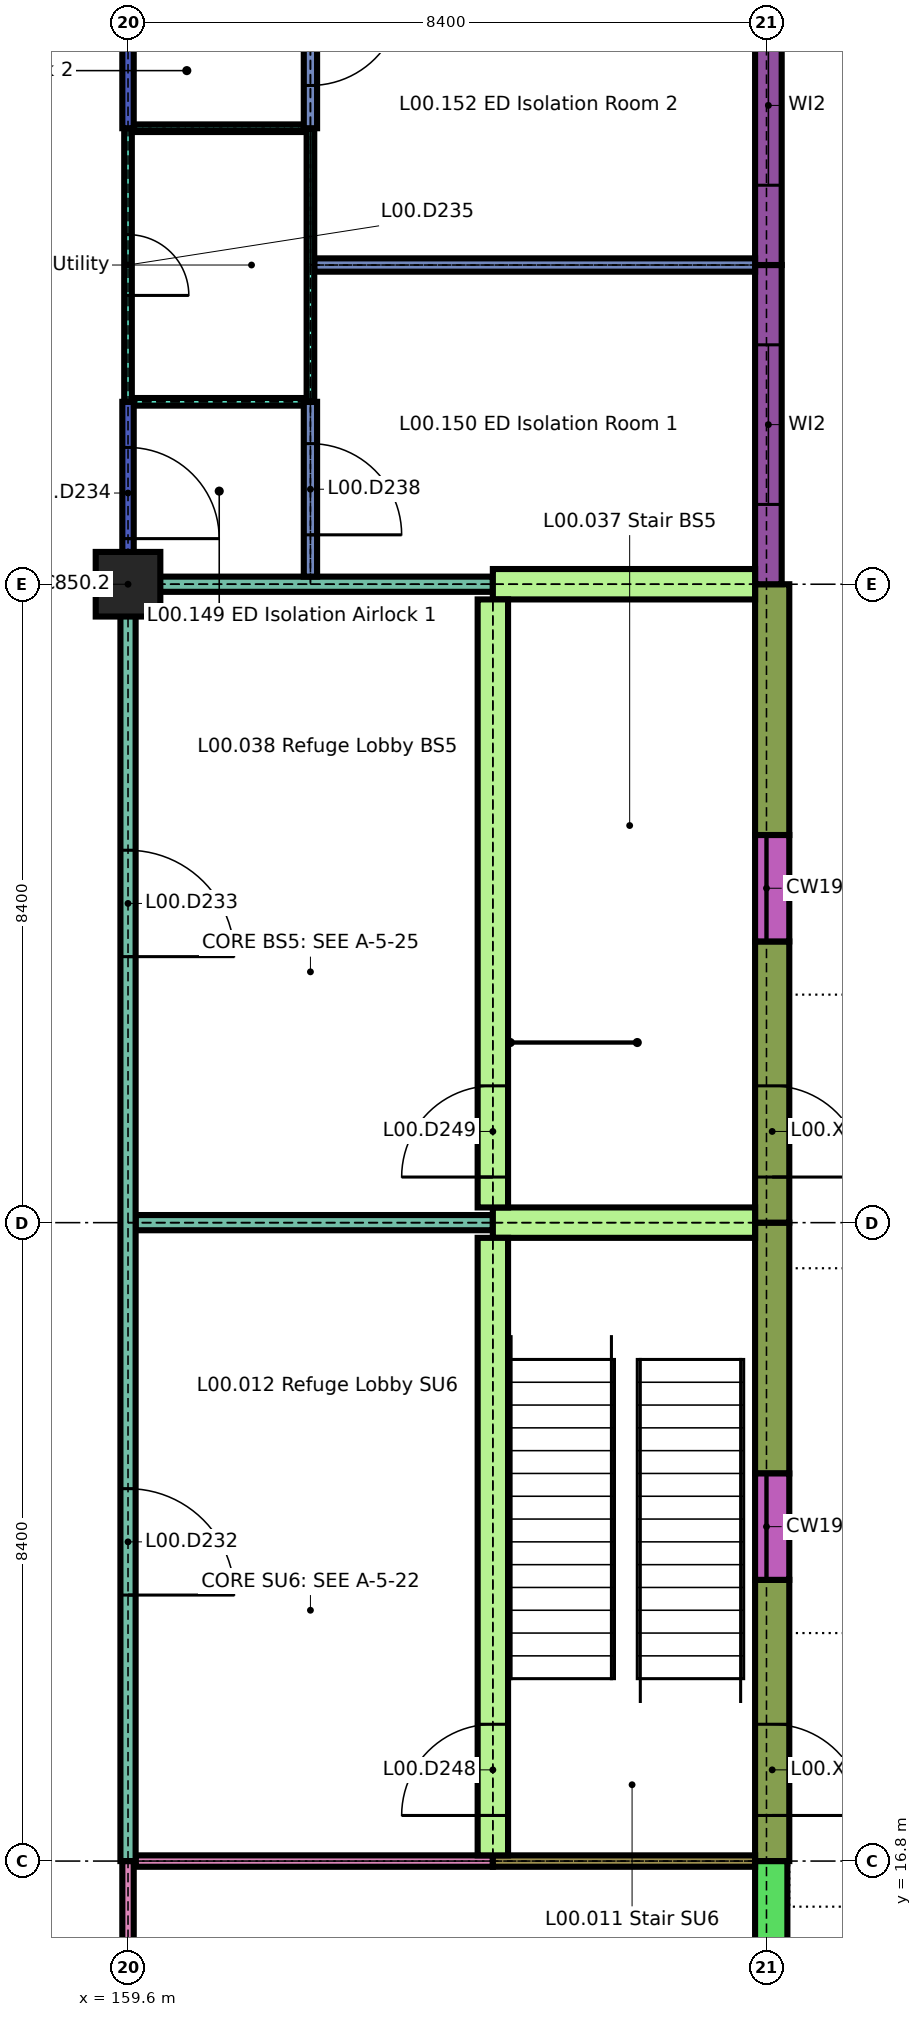
"""IFC4 building model, lengths in metres.
Left out: names, types, materials, properties, quantities, classifications, styles, units other than length and angle.
Written with IfcOpenShell. Run it as: python <this file> out.ifc"""

import sys

from ifc_helpers import new_model, si_unit, direction, frame, frame_2d, origin, origin_2d, place, context, subcontext, project, spatial, rectangle, extrude, element, fill, save


model = new_model("IFC4")
c1 = context("Model", 3, precision=1e-05, world=origin(), true_north=direction((0.0, 1.0)))
c2 = subcontext(c1, "Body", "Model", "MODEL_VIEW")
j1 = project(units=[si_unit("LENGTHUNIT", "METRE"), si_unit("PLANEANGLEUNIT", "RADIAN")], contexts=[c1])
p1 = place(None, origin())
s1 = spatial("IfcSite", under=j1, at=p1, CompositionType="ELEMENT")
p2 = place(p1, origin())
s2 = spatial("IfcBuilding", under=s1, at=p2, CompositionType="ELEMENT")
p3 = place(p2, origin())
s3 = spatial("IfcBuildingStorey", under=s2, at=p3, CompositionType="ELEMENT", Elevation=0.0)
p4 = place(p3, frame((168.062, 11.4, 0.0), z_axis=(0.0, 0.0, 1.0), x_axis=(0.0, 1.0, 0.0)))
e1 = element("IfcWall", 1, at=p4, inside=s3, PredefinedType="SOLIDWALL", context=c2, shape_type="SweptSolid", body=[
    extrude(rectangle(XDim=5.4, YDim=0.425, at=frame_2d((2.7, 0.0))), origin(), (0.0, 0.0, 1.0), 3.84),
])
p5 = place(p3, frame((168.075, 16.8, 0.0), z_axis=(0.0, 0.0, 1.0), x_axis=(0.0, 1.0, 0.0)))
e2 = element("IfcWall", 2, at=p5, inside=s3, PredefinedType="SOLIDWALL", context=c2, shape_type="SweptSolid", body=[
    extrude(rectangle(XDim=3.7, YDim=0.45, at=frame_2d((1.85, 0.0))), origin(), (0.0, 0.0, 1.0), 4.14),
])
p6 = place(p5, frame((0.6, 0.0, 0.0)))
e3 = element("IfcOpeningElement", 3, at=p6, cuts=e2, PredefinedType="OPENING", context=c2, shape_type="SweptSolid", body=[
    extrude(rectangle(XDim=1.2, YDim=2.1, at=frame_2d((0.6, 1.05))), frame((0.0, 0.235, 0.0), z_axis=(0.0, -1.0, 0.0), x_axis=(1.0, 0.0, 0.0)), (0.0, 0.0, 1.0), 0.47),
])
p7 = place(p3, frame((168.075, 21.9, 0.0), z_axis=(0.0, 0.0, 1.0), x_axis=(0.0, 1.0, 0.0)))
e4 = element("IfcWall", 4, at=p7, inside=s3, PredefinedType="SOLIDWALL", context=c2, shape_type="SweptSolid", body=[
    extrude(rectangle(XDim=3.3, YDim=0.45, at=frame_2d((1.65, 0.0))), origin(), (0.0, 0.0, 1.0), 4.14),
])
p8 = place(p3, frame((168.075, 20.5, 0.0), z_axis=(0.0, 0.0, 1.0), x_axis=(0.0, 1.0, 0.0)))
e5 = element("IfcWall", 5, at=p8, inside=s3, PredefinedType="SOLIDWALL", context=c2, shape_type="SweptSolid", body=[
    extrude(rectangle(XDim=1.4, YDim=0.45, at=frame_2d((0.7, 0.0))), origin(), (0.0, 0.0, 1.0), 0.6),
])
p9 = place(p3, frame((168.075, 25.2, 0.0), z_axis=(0.0, 0.0, 1.0), x_axis=(0.0, 1.0, 0.0)))
e6 = element("IfcWall", 6, at=p9, inside=s3, PredefinedType="SOLIDWALL", context=c2, shape_type="SweptSolid", body=[
    extrude(rectangle(XDim=3.7, YDim=0.45, at=frame_2d((1.85, 0.0))), origin(), (0.0, 0.0, 1.0), 4.14),
])
p10 = place(p9, frame((0.6, 0.0, 0.0)))
e7 = element("IfcOpeningElement", 7, at=p10, cuts=e6, PredefinedType="OPENING", context=c2, shape_type="SweptSolid", body=[
    extrude(rectangle(XDim=1.2, YDim=2.1, at=frame_2d((0.6, 1.05))), frame((0.0, 0.235, 0.0), z_axis=(0.0, -1.0, 0.0), x_axis=(1.0, 0.0, 0.0)), (0.0, 0.0, 1.0), 0.47),
])
p11 = place(p3, frame((168.075, 30.3, 0.0), z_axis=(0.0, 0.0, 1.0), x_axis=(0.0, 1.0, 0.0)))
e8 = element("IfcWall", 8, at=p11, inside=s3, PredefinedType="SOLIDWALL", context=c2, shape_type="SweptSolid", body=[
    extrude(rectangle(XDim=3.3, YDim=0.45, at=frame_2d((1.65, 0.0))), origin(), (0.0, 0.0, 1.0), 4.14),
])
p12 = place(p3, frame((168.075, 28.9, 0.0), z_axis=(0.0, 0.0, 1.0), x_axis=(0.0, 1.0, 0.0)))
e9 = element("IfcWall", 9, at=p12, inside=s3, PredefinedType="SOLIDWALL", context=c2, shape_type="SweptSolid", body=[
    extrude(rectangle(XDim=1.4, YDim=0.45, at=frame_2d((0.7, 0.0))), origin(), (0.0, 0.0, 1.0), 0.6),
])
p13 = place(p3, frame((168.025, 33.6, 0.0), z_axis=(0.0, 0.0, 1.0), x_axis=(0.0, 1.0, 0.0)))
e10 = element("IfcWall", 10, at=p13, inside=s3, PredefinedType="SOLIDWALL", context=c2, shape_type="SweptSolid", body=[
    extrude(rectangle(XDim=4.2, YDim=0.35, at=frame_2d((2.1, 0.0))), origin(), (0.0, 0.0, 1.0), 3.84),
])
p14 = place(p13, frame((1.05, 0.0, 0.9)))
e11 = element("IfcOpeningElement", 11, at=p14, cuts=e10, PredefinedType="OPENING", context=c2, shape_type="SweptSolid", body=[
    extrude(rectangle(XDim=2.1, YDim=2.1, at=frame_2d((1.05, 1.05))), frame((0.0, 0.185, 0.0), z_axis=(0.0, -1.0, 0.0), x_axis=(1.0, 0.0, 0.0)), (0.0, 0.0, 1.0), 0.37),
])
p15 = place(p3, frame((168.025, 37.8, 0.0), z_axis=(0.0, 0.0, 1.0), x_axis=(0.0, 1.0, 0.0)))
e12 = element("IfcWall", 12, at=p15, inside=s3, PredefinedType="SOLIDWALL", context=c2, shape_type="SweptSolid", body=[
    extrude(rectangle(XDim=3.775, YDim=0.35, at=frame_2d((1.887, 0.0))), origin(), (0.0, 0.0, 1.0), 3.84),
])
p16 = place(p15, frame((1.05, 0.0, 0.9)))
e13 = element("IfcOpeningElement", 13, at=p16, cuts=e12, PredefinedType="OPENING", context=c2, shape_type="SweptSolid", body=[
    extrude(rectangle(XDim=2.1, YDim=2.1, at=frame_2d((1.05, 1.05))), frame((0.0, 0.185, 0.0), z_axis=(0.0, -1.0, 0.0), x_axis=(1.0, 0.0, 0.0)), (0.0, 0.0, 1.0), 0.37),
])
p17 = place(p3, frame((159.7, 16.8, 0.0), z_axis=(0.0, 0.0, 1.0), x_axis=(1.0, 0.0, 0.0)))
e14 = element("IfcWall", 14, at=p17, inside=s3, PredefinedType="PARTITIONING", context=c2, shape_type="SweptSolid", body=[
    extrude(rectangle(XDim=4.7, YDim=0.15, at=frame_2d((2.35, 0.0))), origin(), (0.0, 0.0, 1.0), 4.14),
])
p18 = place(p3, frame((164.4, 16.8, 0.0), z_axis=(0.0, 0.0, 1.0), x_axis=(1.0, 0.0, 0.0)))
e15 = element("IfcWall", 15, at=p18, inside=s3, PredefinedType="PARTITIONING", context=c2, shape_type="SweptSolid", body=[
    extrude(rectangle(XDim=3.45, YDim=0.15, at=frame_2d((1.725, 0.0))), origin(), (0.0, 0.0, 1.0), 4.14),
])
p19 = place(p3, frame((159.7, 25.2, 0.0), z_axis=(0.0, 0.0, 1.0), x_axis=(1.0, 0.0, 0.0)))
e16 = element("IfcWall", 16, at=p19, inside=s3, PredefinedType="PARTITIONING", context=c2, shape_type="SweptSolid", body=[
    extrude(rectangle(XDim=4.7, YDim=0.2, at=frame_2d((2.35, 0.0))), origin(), (0.0, 0.0, 1.0), 4.14),
])
p20 = place(p3, frame((164.4, 25.2, 0.0), z_axis=(0.0, 0.0, 1.0), x_axis=(1.0, 0.0, 0.0)))
e17 = element("IfcWall", 17, at=p20, inside=s3, PredefinedType="SHEAR", context=c2, shape_type="SweptSolid", body=[
    extrude(rectangle(XDim=3.45, YDim=0.4, at=frame_2d((1.725, 0.0))), origin(), (0.0, 0.0, 1.0), 4.14),
])
p21 = place(p3, frame((159.7, 33.6, 0.0), z_axis=(0.0, 0.0, 1.0), x_axis=(1.0, 0.0, 0.0)))
e18 = element("IfcWall", 18, at=p21, inside=s3, PredefinedType="PARTITIONING", context=c2, shape_type="SweptSolid", body=[
    extrude(rectangle(XDim=4.7, YDim=0.2, at=frame_2d((2.35, 0.0))), origin(), (0.0, 0.0, 1.0), 4.14),
])
p22 = place(p3, frame((164.4, 33.6, 0.0), z_axis=(0.0, 0.0, 1.0), x_axis=(1.0, 0.0, 0.0)))
e19 = element("IfcWall", 19, at=p22, inside=s3, PredefinedType="SHEAR", context=c2, shape_type="SweptSolid", body=[
    extrude(rectangle(XDim=3.45, YDim=0.4, at=frame_2d((1.725, 0.0))), origin(), (0.0, 0.0, 1.0), 4.14),
])
p23 = place(p3, frame((159.675, 36.0, 0.0), z_axis=(0.0, 0.0, 1.0), x_axis=(1.0, 0.0, 0.0)))
e20 = element("IfcWall", 20, at=p23, inside=s3, PredefinedType="PARTITIONING", context=c2, shape_type="SweptSolid", body=[
    extrude(rectangle(XDim=2.238, YDim=0.1, at=frame_2d((1.119, 0.0))), origin(), (0.0, 0.0, 1.0), 4.14),
])
p24 = place(p3, frame((162.05, 37.8, 0.0), z_axis=(0.0, 0.0, 1.0), x_axis=(1.0, 0.0, 0.0)))
e21 = element("IfcWall", 21, at=p24, inside=s3, PredefinedType="PARTITIONING", context=c2, shape_type="SweptSolid", body=[
    extrude(rectangle(XDim=5.8, YDim=0.175, at=frame_2d((2.9, 0.0))), origin(), (0.0, 0.0, 1.0), 4.14),
])
p25 = place(p3, frame((159.675, 39.6, 0.0), z_axis=(0.0, 0.0, 1.0), x_axis=(1.0, 0.0, 0.0)))
e22 = element("IfcWall", 22, at=p25, inside=s3, PredefinedType="PARTITIONING", context=c2, shape_type="SweptSolid", body=[
    extrude(rectangle(XDim=2.238, YDim=0.1, at=frame_2d((1.119, 0.0))), origin(), (0.0, 0.0, 1.0), 4.14),
])
p26 = place(p3, frame((159.6, 11.475, 0.0), z_axis=(0.0, 0.0, 1.0), x_axis=(0.0, 1.0, 0.0)))
e23 = element("IfcWall", 23, at=p26, inside=s3, PredefinedType="PARTITIONING", context=c2, shape_type="SweptSolid", body=[
    extrude(rectangle(XDim=5.325, YDim=0.15, at=frame_2d((2.663, 0.0))), origin(), (0.0, 0.0, 1.0), 4.14),
])
p27 = place(p3, frame((159.6, 16.8, 0.0), z_axis=(0.0, 0.0, 1.0), x_axis=(0.0, 1.0, 0.0)))
e24 = element("IfcWall", 24, at=p27, inside=s3, PredefinedType="PARTITIONING", context=c2, shape_type="SweptSolid", body=[
    extrude(rectangle(XDim=16.8, YDim=0.2, at=frame_2d((8.4, 0.0))), origin(), (0.0, 0.0, 1.0), 4.14),
])
p28 = place(p27, frame((3.5, 0.0, 0.0)))
e25 = element("IfcOpeningElement", 25, at=p28, cuts=e24, PredefinedType="OPENING", context=c2, shape_type="SweptSolid", body=[
    extrude(rectangle(XDim=1.4, YDim=2.1, at=frame_2d((0.7, 1.05))), frame((0.0, 0.11, 0.0), z_axis=(0.0, -1.0, 0.0), x_axis=(1.0, 0.0, 0.0)), (0.0, 0.0, 1.0), 0.22),
])
p29 = place(p27, frame((11.9, 0.0, 0.0)))
e26 = element("IfcOpeningElement", 26, at=p29, cuts=e24, PredefinedType="OPENING", context=c2, shape_type="SweptSolid", body=[
    extrude(rectangle(XDim=1.4, YDim=2.1, at=frame_2d((0.7, 1.05))), frame((0.0, 0.11, 0.0), z_axis=(0.0, -1.0, 0.0), x_axis=(1.0, 0.0, 0.0)), (0.0, 0.0, 1.0), 0.22),
])
p30 = place(p3, frame((159.6, 33.6, 0.0), z_axis=(0.0, 0.0, 1.0), x_axis=(0.0, 1.0, 0.0)))
e27 = element("IfcWall", 27, at=p30, inside=s3, PredefinedType="PARTITIONING", context=c2, shape_type="SweptSolid", body=[
    extrude(rectangle(XDim=2.4, YDim=0.15, at=frame_2d((1.2, 0.0))), origin(), (0.0, 0.0, 1.0), 4.14),
])
p31 = place(p30, frame((0.6, 0.0, 0.0)))
e28 = element("IfcOpeningElement", 28, at=p31, cuts=e27, PredefinedType="OPENING", context=c2, shape_type="SweptSolid", body=[
    extrude(rectangle(XDim=1.2, YDim=2.1, at=frame_2d((0.6, 1.05))), frame((0.0, 0.085, 0.0), z_axis=(0.0, -1.0, 0.0), x_axis=(1.0, 0.0, 0.0)), (0.0, 0.0, 1.0), 0.17),
])
p32 = place(p3, frame((159.6, 36.0, 0.0), z_axis=(0.0, 0.0, 1.0), x_axis=(0.0, 1.0, 0.0)))
e29 = element("IfcWall", 29, at=p32, inside=s3, PredefinedType="PARTITIONING", context=c2, shape_type="SweptSolid", body=[
    extrude(rectangle(XDim=3.6, YDim=0.1, at=frame_2d((1.8, 0.0))), origin(), (0.0, 0.0, 1.0), 4.14),
])
p33 = place(p32, frame((1.4, 0.0, 0.0)))
e30 = element("IfcOpeningElement", 30, at=p33, cuts=e29, PredefinedType="OPENING", context=c2, shape_type="SweptSolid", body=[
    extrude(rectangle(XDim=0.8, YDim=2.1, at=frame_2d((0.4, 1.05))), frame((0.0, 0.06, 0.0), z_axis=(0.0, -1.0, 0.0), x_axis=(1.0, 0.0, 0.0)), (0.0, 0.0, 1.0), 0.12),
])
p34 = place(p3, frame((159.6, 39.6, 0.0), z_axis=(0.0, 0.0, 1.0), x_axis=(0.0, 1.0, 0.0)))
e31 = element("IfcWall", 31, at=p34, inside=s3, PredefinedType="PARTITIONING", context=c2, shape_type="SweptSolid", body=[
    extrude(rectangle(XDim=1.975, YDim=0.15, at=frame_2d((0.987, 0.0))), origin(), (0.0, 0.0, 1.0), 4.14),
])
p35 = place(p3, frame((162.0, 33.7, 0.0), z_axis=(0.0, 0.0, 1.0), x_axis=(0.0, 1.0, 0.0)))
e32 = element("IfcWall", 32, at=p35, inside=s3, PredefinedType="PARTITIONING", context=c2, shape_type="SweptSolid", body=[
    extrude(rectangle(XDim=2.3, YDim=0.175, at=frame_2d((1.15, 0.0))), origin(), (0.0, 0.0, 1.0), 4.14),
])
p36 = place(p35, frame((0.55, 0.0, 0.0)))
e33 = element("IfcOpeningElement", 33, at=p36, cuts=e32, PredefinedType="OPENING", context=c2, shape_type="SweptSolid", body=[
    extrude(rectangle(XDim=1.2, YDim=2.1, at=frame_2d((0.6, 1.05))), frame((0.0, 0.097, 0.0), z_axis=(0.0, -1.0, 0.0), x_axis=(1.0, 0.0, 0.0)), (0.0, 0.0, 1.0), 0.195),
])
p37 = place(p3, frame((162.0, 36.0, 0.0), z_axis=(0.0, 0.0, 1.0), x_axis=(0.0, 1.0, 0.0)))
e34 = element("IfcWall", 34, at=p37, inside=s3, PredefinedType="PARTITIONING", context=c2, shape_type="SweptSolid", body=[
    extrude(rectangle(XDim=3.6, YDim=0.1, at=frame_2d((1.8, 0.0))), origin(), (0.0, 0.0, 1.0), 4.14),
])
p38 = place(p3, frame((162.0, 39.6, 0.0), z_axis=(0.0, 0.0, 1.0), x_axis=(0.0, 1.0, 0.0)))
e35 = element("IfcWall", 35, at=p38, inside=s3, PredefinedType="PARTITIONING", context=c2, shape_type="SweptSolid", body=[
    extrude(rectangle(XDim=2.325, YDim=0.175, at=frame_2d((1.163, 0.0))), origin(), (0.0, 0.0, 1.0), 4.14),
])
p39 = place(p38, frame((0.562, 0.0, 0.0)))
e36 = element("IfcOpeningElement", 36, at=p39, cuts=e35, PredefinedType="OPENING", context=c2, shape_type="SweptSolid", body=[
    extrude(rectangle(XDim=1.2, YDim=2.1, at=frame_2d((0.6, 1.05))), frame((0.0, 0.097, 0.0), z_axis=(0.0, -1.0, 0.0), x_axis=(1.0, 0.0, 0.0)), (0.0, 0.0, 1.0), 0.195),
])
p40 = place(p3, frame((164.4, 16.875, 0.0), z_axis=(0.0, 0.0, 1.0), x_axis=(0.0, 1.0, 0.0)))
e37 = element("IfcWall", 37, at=p40, inside=s3, PredefinedType="SHEAR", context=c2, shape_type="SweptSolid", body=[
    extrude(rectangle(XDim=8.125, YDim=0.4, at=frame_2d((4.062, 0.0))), origin(), (0.0, 0.0, 1.0), 4.14),
])
p41 = place(p40, frame((0.525, 0.0, 0.0)))
e38 = element("IfcOpeningElement", 38, at=p41, cuts=e37, PredefinedType="OPENING", context=c2, shape_type="SweptSolid", body=[
    extrude(rectangle(XDim=1.2, YDim=2.1, at=frame_2d((0.6, 1.05))), frame((0.0, 0.21, 0.0), z_axis=(0.0, -1.0, 0.0), x_axis=(1.0, 0.0, 0.0)), (0.0, 0.0, 1.0), 0.42),
])
p42 = place(p3, frame((164.4, 25.4, 0.0), z_axis=(0.0, 0.0, 1.0), x_axis=(0.0, 1.0, 0.0)))
e39 = element("IfcWall", 39, at=p42, inside=s3, PredefinedType="SHEAR", context=c2, shape_type="SweptSolid", body=[
    extrude(rectangle(XDim=8.0, YDim=0.4, at=frame_2d((4.0, 0.0))), origin(), (0.0, 0.0, 1.0), 4.14),
])
p43 = place(p42, frame((0.4, 0.0, 0.0)))
e40 = element("IfcOpeningElement", 40, at=p43, cuts=e39, PredefinedType="OPENING", context=c2, shape_type="SweptSolid", body=[
    extrude(rectangle(XDim=1.2, YDim=2.1, at=frame_2d((0.6, 1.05))), frame((0.0, 0.21, 0.0), z_axis=(0.0, -1.0, 0.0), x_axis=(1.0, 0.0, 0.0)), (0.0, 0.0, 1.0), 0.42),
])
p44 = place(p3, frame((159.6, 33.6, 0.0), z_axis=(0.0, 0.0, 1.0), x_axis=(1.0, 0.0, 0.0)))
e41 = element("IfcColumn", 41, at=p44, inside=s3, PredefinedType="COLUMN", context=c2, shape_type="SweptSolid", body=[
    extrude(rectangle(XDim=0.85, YDim=0.85, at=origin_2d()), origin(), (0.0, 0.0, 1.0), 4.14),
])
p45 = place(p6, frame((1.2, 0.0, 0.0), x_axis=(-1.0, 0.0, 0.0)))
e42 = element("IfcDoor", 42, at=p45, inside=s3, OperationType="SINGLE_SWING_LEFT", PredefinedType="DOOR", context=c2, shape_type="SweptSolid", body=[
    extrude(rectangle(XDim=1.2, YDim=2.1, at=frame_2d((0.6, 1.05))), frame((0.0, 0.025, 0.0), z_axis=(0.0, -1.0, 0.0), x_axis=(1.0, 0.0, 0.0)), (0.0, 0.0, 1.0), 0.05),
])
fill(e3, e42)
p46 = place(p10, frame((1.2, 0.0, 0.0), x_axis=(-1.0, 0.0, 0.0)))
e43 = element("IfcDoor", 43, at=p46, inside=s3, OperationType="SINGLE_SWING_LEFT", PredefinedType="DOOR", context=c2, shape_type="SweptSolid", body=[
    extrude(rectangle(XDim=1.2, YDim=2.1, at=frame_2d((0.6, 1.05))), frame((0.0, 0.025, 0.0), z_axis=(0.0, -1.0, 0.0), x_axis=(1.0, 0.0, 0.0)), (0.0, 0.0, 1.0), 0.05),
])
fill(e7, e43)
p47 = place(p14, origin())
e44 = element("IfcWindow", 44, at=p47, inside=s3, PartitioningType="SINGLE_PANEL", PredefinedType="WINDOW", context=c2, shape_type="SweptSolid", body=[
    extrude(rectangle(XDim=2.1, YDim=2.1, at=frame_2d((1.05, 1.05))), frame((0.0, 0.045, 0.0), z_axis=(0.0, -1.0, 0.0), x_axis=(1.0, 0.0, 0.0)), (0.0, 0.0, 1.0), 0.09),
])
fill(e11, e44)
p48 = place(p16, origin())
e45 = element("IfcWindow", 45, at=p48, inside=s3, PartitioningType="SINGLE_PANEL", PredefinedType="WINDOW", context=c2, shape_type="SweptSolid", body=[
    extrude(rectangle(XDim=2.1, YDim=2.1, at=frame_2d((1.05, 1.05))), frame((0.0, 0.045, 0.0), z_axis=(0.0, -1.0, 0.0), x_axis=(1.0, 0.0, 0.0)), (0.0, 0.0, 1.0), 0.09),
])
fill(e13, e45)
p49 = place(p28, origin())
e46 = element("IfcDoor", 46, at=p49, inside=s3, OperationType="SINGLE_SWING_LEFT", PredefinedType="DOOR", context=c2, shape_type="SweptSolid", body=[
    extrude(rectangle(XDim=1.4, YDim=2.1, at=frame_2d((0.7, 1.05))), frame((0.0, 0.03, 0.0), z_axis=(0.0, -1.0, 0.0), x_axis=(1.0, 0.0, 0.0)), (0.0, 0.0, 1.0), 0.06),
])
fill(e25, e46)
p50 = place(p29, origin())
e47 = element("IfcDoor", 47, at=p50, inside=s3, OperationType="SINGLE_SWING_LEFT", PredefinedType="DOOR", context=c2, shape_type="SweptSolid", body=[
    extrude(rectangle(XDim=1.4, YDim=2.1, at=frame_2d((0.7, 1.05))), frame((0.0, 0.03, 0.0), z_axis=(0.0, -1.0, 0.0), x_axis=(1.0, 0.0, 0.0)), (0.0, 0.0, 1.0), 0.06),
])
fill(e26, e47)
p51 = place(p31, origin())
e48 = element("IfcDoor", 48, at=p51, inside=s3, OperationType="SINGLE_SWING_LEFT", PredefinedType="DOOR", context=c2, shape_type="SweptSolid", body=[
    extrude(rectangle(XDim=1.2, YDim=2.1, at=frame_2d((0.6, 1.05))), frame((0.0, 0.05, 0.0), z_axis=(0.0, -1.0, 0.0), x_axis=(1.0, 0.0, 0.0)), (0.0, 0.0, 1.0), 0.1),
])
fill(e28, e48)
p52 = place(p33, origin())
e49 = element("IfcDoor", 49, at=p52, inside=s3, OperationType="SINGLE_SWING_LEFT", PredefinedType="DOOR", context=c2, shape_type="SweptSolid", body=[
    extrude(rectangle(XDim=0.8, YDim=2.1, at=frame_2d((0.4, 1.05))), frame((0.0, 0.02, 0.0), z_axis=(0.0, -1.0, 0.0), x_axis=(1.0, 0.0, 0.0)), (0.0, 0.0, 1.0), 0.04),
])
fill(e30, e49)
p53 = place(p36, origin())
e50 = element("IfcDoor", 50, at=p53, inside=s3, OperationType="SINGLE_SWING_LEFT", PredefinedType="DOOR", context=c2, shape_type="SweptSolid", body=[
    extrude(rectangle(XDim=1.2, YDim=2.1, at=frame_2d((0.6, 1.05))), frame((0.0, 0.05, 0.0), z_axis=(0.0, -1.0, 0.0), x_axis=(1.0, 0.0, 0.0)), (0.0, 0.0, 1.0), 0.1),
])
fill(e33, e50)
p54 = place(p39, origin())
e51 = element("IfcDoor", 51, at=p54, inside=s3, OperationType="SINGLE_SWING_RIGHT", PredefinedType="DOOR", context=c2, shape_type="SweptSolid", body=[
    extrude(rectangle(XDim=1.2, YDim=2.1, at=frame_2d((0.6, 1.05))), frame((0.0, 0.05, 0.0), z_axis=(0.0, -1.0, 0.0), x_axis=(1.0, 0.0, 0.0)), (0.0, 0.0, 1.0), 0.1),
])
fill(e36, e51)
p55 = place(p41, origin())
e52 = element("IfcDoor", 52, at=p55, inside=s3, OperationType="SINGLE_SWING_RIGHT", PredefinedType="DOOR", context=c2, shape_type="SweptSolid", body=[
    extrude(rectangle(XDim=1.2, YDim=2.1, at=frame_2d((0.6, 1.05))), frame((0.0, 0.025, 0.0), z_axis=(0.0, -1.0, 0.0), x_axis=(1.0, 0.0, 0.0)), (0.0, 0.0, 1.0), 0.05),
])
fill(e38, e52)
p56 = place(p43, origin())
e53 = element("IfcDoor", 53, at=p56, inside=s3, OperationType="SINGLE_SWING_RIGHT", PredefinedType="DOOR", context=c2, shape_type="SweptSolid", body=[
    extrude(rectangle(XDim=1.2, YDim=2.1, at=frame_2d((0.6, 1.05))), frame((0.0, 0.025, 0.0), z_axis=(0.0, -1.0, 0.0), x_axis=(1.0, 0.0, 0.0)), (0.0, 0.0, 1.0), 0.05),
])
fill(e40, e53)
save(model, sys.argv[1])
